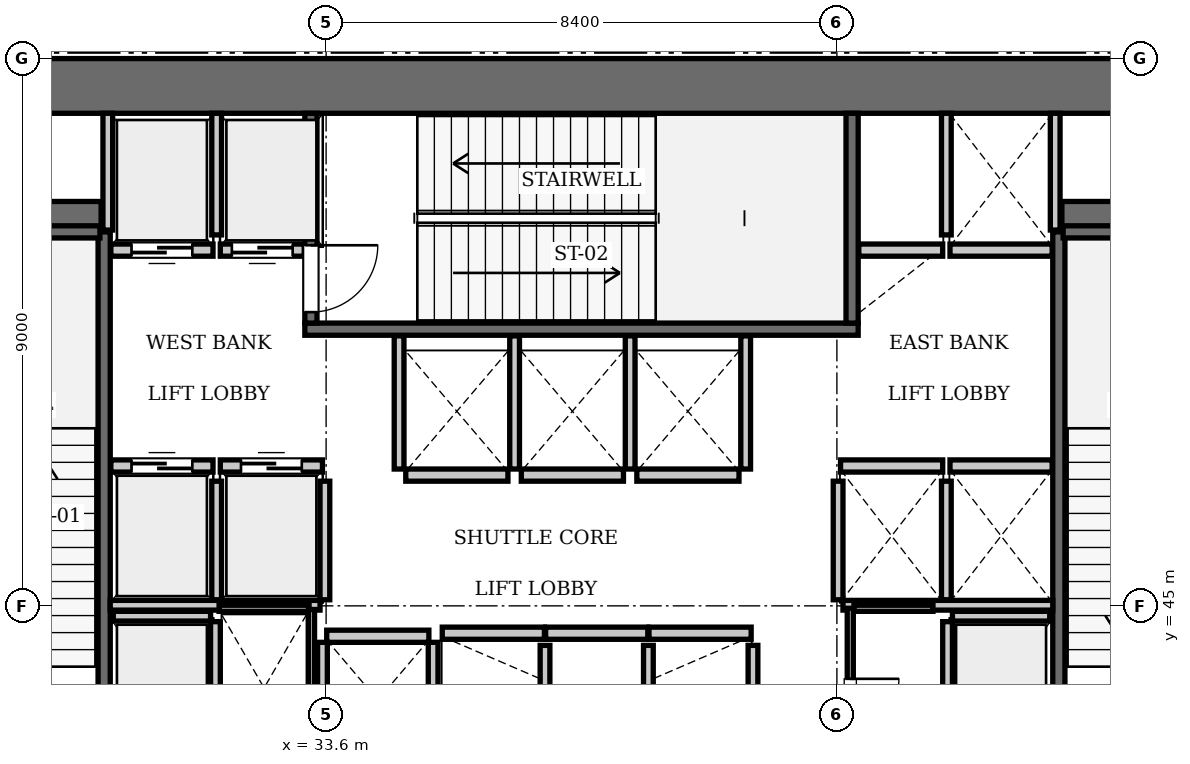
"""IFC4 building model, lengths in metres.
Left out: names, types, materials, properties, quantities, classifications, styles, units other than length and angle.
Written with IfcOpenShell. Run it as: python <this file> out.ifc"""

import sys

from ifc_helpers import new_model, si_unit, direction, frame, frame_2d, origin, place, context, subcontext, project, spatial, rectangle, extrude, element, fill, save


model = new_model("IFC4")
c1 = context("Model", 3, precision=1e-05, world=origin(), true_north=direction((0.0, 1.0)))
c2 = subcontext(c1, "Body", "Model", "MODEL_VIEW")
j1 = project(units=[si_unit("LENGTHUNIT", "METRE"), si_unit("PLANEANGLEUNIT", "RADIAN")], contexts=[c1])
p1 = place(None, origin())
s1 = spatial("IfcSite", under=j1, at=p1, CompositionType="ELEMENT")
p2 = place(p1, origin())
s2 = spatial("IfcBuilding", under=s1, at=p2, CompositionType="ELEMENT")
p3 = place(p2, frame((0.0, 0.0, 5.6)))
s3 = spatial("IfcBuildingStorey", under=s2, at=p3, CompositionType="ELEMENT", Elevation=5.6)
p4 = place(p3, frame((25.2, 53.55, 0.0), z_axis=(0.0, 0.0, 1.0), x_axis=(1.0, 0.0, 0.0)))
e1 = element("IfcWall", 1, at=p4, inside=s3, PredefinedType="SHEAR", context=c2, shape_type="SweptSolid", body=[
    extrude(rectangle(XDim=25.2, YDim=0.9, at=frame_2d((12.6, 0.0))), origin(), (0.0, 0.0, 1.0), 5.25),
])
p5 = place(p3, frame((26.1, 51.4, 0.0), z_axis=(0.0, 0.0, 1.0), x_axis=(1.0, 0.0, 0.0)))
e2 = element("IfcWall", 2, at=p5, inside=s3, PredefinedType="SHEAR", context=c2, shape_type="SweptSolid", body=[
    extrude(rectangle(XDim=3.8, YDim=0.5, at=frame_2d((1.9, 0.0))), origin(), (0.0, 0.0, 1.0), 5.25),
])
p6 = place(p3, frame((45.7, 51.4, 0.0), z_axis=(0.0, 0.0, 1.0), x_axis=(1.0, 0.0, 0.0)))
e3 = element("IfcWall", 3, at=p6, inside=s3, PredefinedType="SHEAR", context=c2, shape_type="SweptSolid", body=[
    extrude(rectangle(XDim=3.8, YDim=0.5, at=frame_2d((1.9, 0.0))), origin(), (0.0, 0.0, 1.0), 5.25),
])
p7 = place(p3, frame((29.95, 42.3, 0.0), z_axis=(0.0, 0.0, 1.0), x_axis=(0.0, 1.0, 0.0)))
e4 = element("IfcWall", 4, at=p7, inside=s3, PredefinedType="SOLIDWALL", context=c2, shape_type="SweptSolid", body=[
    extrude(rectangle(XDim=8.85, YDim=0.2, at=frame_2d((4.425, 0.0))), origin(), (0.0, 0.0, 1.0), 4.97),
])
p8 = place(p3, frame((26.38, 51.15, 0.0), z_axis=(0.0, 0.0, 1.0), x_axis=(1.0, 0.0, 0.0)))
e5 = element("IfcWall", 5, at=p8, inside=s3, PredefinedType="SOLIDWALL", context=c2, shape_type="SweptSolid", body=[
    extrude(rectangle(XDim=3.5, YDim=0.2, at=frame_2d((1.75, 0.0))), origin(), (0.0, 0.0, 1.0), 4.97),
])
p9 = place(p3, frame((33.25, 49.55, 0.0), z_axis=(0.0, 0.0, 1.0), x_axis=(1.0, 0.0, 0.0)))
e6 = element("IfcWall", 6, at=p9, inside=s3, PredefinedType="SOLIDWALL", context=c2, shape_type="SweptSolid", body=[
    extrude(rectangle(XDim=9.1, YDim=0.2, at=frame_2d((4.55, 0.0))), origin(), (0.0, 0.0, 1.0), 4.97),
])
p10 = place(p3, frame((42.25, 49.65, 0.0), z_axis=(0.0, 0.0, 1.0), x_axis=(0.0, 1.0, 0.0)))
e7 = element("IfcWall", 7, at=p10, inside=s3, PredefinedType="SOLIDWALL", context=c2, shape_type="SweptSolid", body=[
    extrude(rectangle(XDim=3.45, YDim=0.2, at=frame_2d((1.725, 0.0))), origin(), (0.0, 0.0, 1.0), 4.97),
])
p11 = place(p3, frame((33.35, 49.65, 0.0), z_axis=(0.0, 0.0, 1.0), x_axis=(0.0, 1.0, 0.0)))
e8 = element("IfcWall", 8, at=p11, inside=s3, PredefinedType="SOLIDWALL", context=c2, shape_type="SweptSolid", body=[
    extrude(rectangle(XDim=3.45, YDim=0.2, at=frame_2d((1.725, 0.0))), origin(), (0.0, 0.0, 1.0), 4.97),
])
p12 = place(p11, frame((0.18, 0.0, 0.0)))
e9 = element("IfcOpeningElement", 9, at=p12, cuts=e8, PredefinedType="OPENING", context=c2, shape_type="SweptSolid", body=[
    extrude(rectangle(XDim=1.1, YDim=2.15, at=frame_2d((0.55, 1.075))), frame((0.0, 0.11, 0.0), z_axis=(0.0, -1.0, 0.0), x_axis=(1.0, 0.0, 0.0)), (0.0, 0.0, 1.0), 0.22),
])
p13 = place(p3, frame((45.65, 42.3, 0.0), z_axis=(0.0, 0.0, 1.0), x_axis=(0.0, 1.0, 0.0)))
e10 = element("IfcWall", 10, at=p13, inside=s3, PredefinedType="SOLIDWALL", context=c2, shape_type="SweptSolid", body=[
    extrude(rectangle(XDim=8.85, YDim=0.2, at=frame_2d((4.425, 0.0))), origin(), (0.0, 0.0, 1.0), 4.97),
])
p14 = place(p3, frame((45.72, 51.15, 0.0), z_axis=(0.0, 0.0, 1.0), x_axis=(1.0, 0.0, 0.0)))
e11 = element("IfcWall", 11, at=p14, inside=s3, PredefinedType="SOLIDWALL", context=c2, shape_type="SweptSolid", body=[
    extrude(rectangle(XDim=3.5, YDim=0.2, at=frame_2d((1.75, 0.0))), origin(), (0.0, 0.0, 1.0), 4.97),
])
p15 = place(p3, frame((30.06, 47.3, 0.0), z_axis=(0.0, 0.0, 1.0), x_axis=(1.0, 0.0, 0.0)))
e12 = element("IfcWall", 12, at=p15, inside=s3, PredefinedType="SOLIDWALL", context=c2, shape_type="SweptSolid", body=[
    extrude(rectangle(XDim=1.68, YDim=0.2, at=frame_2d((0.84, 0.0))), origin(), (0.0, 0.0, 1.0), 4.97),
])
p16 = place(p15, frame((0.34, 0.0, 0.0)))
e13 = element("IfcOpeningElement", 13, at=p16, cuts=e12, PredefinedType="OPENING", context=c2, shape_type="SweptSolid", body=[
    extrude(rectangle(XDim=1.0, YDim=2.15, at=frame_2d((0.5, 1.075))), frame((0.0, 0.11, 0.0), z_axis=(0.0, -1.0, 0.0), x_axis=(1.0, 0.0, 0.0)), (0.0, 0.0, 1.0), 0.22),
])
p17 = place(p3, frame((31.86, 47.3, 0.0), z_axis=(0.0, 0.0, 1.0), x_axis=(1.0, 0.0, 0.0)))
e14 = element("IfcWall", 14, at=p17, inside=s3, PredefinedType="SOLIDWALL", context=c2, shape_type="SweptSolid", body=[
    extrude(rectangle(XDim=1.68, YDim=0.2, at=frame_2d((0.84, 0.0))), origin(), (0.0, 0.0, 1.0), 4.97),
])
p18 = place(p17, frame((0.34, 0.0, 0.0)))
e15 = element("IfcOpeningElement", 15, at=p18, cuts=e14, PredefinedType="OPENING", context=c2, shape_type="SweptSolid", body=[
    extrude(rectangle(XDim=1.0, YDim=2.15, at=frame_2d((0.5, 1.075))), frame((0.0, 0.11, 0.0), z_axis=(0.0, -1.0, 0.0), x_axis=(1.0, 0.0, 0.0)), (0.0, 0.0, 1.0), 0.22),
])
p19 = place(p3, frame((30.06, 50.85, 0.0), z_axis=(0.0, 0.0, 1.0), x_axis=(1.0, 0.0, 0.0)))
e16 = element("IfcWall", 16, at=p19, inside=s3, PredefinedType="SOLIDWALL", context=c2, shape_type="SweptSolid", body=[
    extrude(rectangle(XDim=1.68, YDim=0.2, at=frame_2d((0.84, 0.0))), origin(), (0.0, 0.0, 1.0), 4.97),
])
p20 = place(p19, frame((0.34, 0.0, 0.0)))
e17 = element("IfcOpeningElement", 17, at=p20, cuts=e16, PredefinedType="OPENING", context=c2, shape_type="SweptSolid", body=[
    extrude(rectangle(XDim=1.0, YDim=2.15, at=frame_2d((0.5, 1.075))), frame((0.0, 0.11, 0.0), z_axis=(0.0, -1.0, 0.0), x_axis=(1.0, 0.0, 0.0)), (0.0, 0.0, 1.0), 0.22),
])
p21 = place(p3, frame((31.86, 50.85, 0.0), z_axis=(0.0, 0.0, 1.0), x_axis=(1.0, 0.0, 0.0)))
e18 = element("IfcWall", 18, at=p21, inside=s3, PredefinedType="SOLIDWALL", context=c2, shape_type="SweptSolid", body=[
    extrude(rectangle(XDim=1.38, YDim=0.2, at=frame_2d((0.69, 0.0))), origin(), (0.0, 0.0, 1.0), 4.97),
])
p22 = place(p21, frame((0.19, 0.0, 0.0)))
e19 = element("IfcOpeningElement", 19, at=p22, cuts=e18, PredefinedType="OPENING", context=c2, shape_type="SweptSolid", body=[
    extrude(rectangle(XDim=1.0, YDim=2.15, at=frame_2d((0.5, 1.075))), frame((0.0, 0.11, 0.0), z_axis=(0.0, -1.0, 0.0), x_axis=(1.0, 0.0, 0.0)), (0.0, 0.0, 1.0), 0.22),
])
for number, where, z_axis, x_axis in (
    (20, (42.06, 47.3, 0.0), (0.0, 0.0, 1.0), (1.0, 0.0, 0.0)),
    (21, (43.86, 47.3, 0.0), (0.0, 0.0, 1.0), (1.0, 0.0, 0.0)),
):
    element("IfcWall", number, at=place(p3, frame(where, z_axis=z_axis, x_axis=x_axis)), inside=s3, PredefinedType="SOLIDWALL", context=c2, shape_type="SweptSolid", body=[
        extrude(rectangle(XDim=1.68, YDim=0.2, at=frame_2d((0.84, 0.0))), origin(), (0.0, 0.0, 1.0), 4.97),
    ])
p23 = place(p3, frame((42.36, 50.85, 0.0), z_axis=(0.0, 0.0, 1.0), x_axis=(1.0, 0.0, 0.0)))
e22 = element("IfcWall", 22, at=p23, inside=s3, PredefinedType="SOLIDWALL", context=c2, shape_type="SweptSolid", body=[
    extrude(rectangle(XDim=1.38, YDim=0.2, at=frame_2d((0.69, 0.0))), origin(), (0.0, 0.0, 1.0), 4.97),
])
for number, where, z_axis, x_axis in (
    (23, (43.86, 50.85, 0.0), (0.0, 0.0, 1.0), (1.0, 0.0, 0.0)),
    (24, (35.51, 44.55, 0.0), (0.0, 0.0, 1.0), (1.0, 0.0, 0.0)),
    (25, (37.21, 44.55, 0.0), (0.0, 0.0, 1.0), (1.0, 0.0, 0.0)),
):
    element("IfcWall", number, at=place(p3, frame(where, z_axis=z_axis, x_axis=x_axis)), inside=s3, PredefinedType="SOLIDWALL", context=c2, shape_type="SweptSolid", body=[
        extrude(rectangle(XDim=1.68, YDim=0.2, at=frame_2d((0.84, 0.0))), origin(), (0.0, 0.0, 1.0), 4.97),
    ])
for number, where, z_axis, x_axis in (
    (26, (38.91, 44.55, 0.0), (0.0, 0.0, 1.0), (1.0, 0.0, 0.0)),
    (27, (34.91, 47.15, 0.0), (0.0, 0.0, 1.0), (1.0, 0.0, 0.0)),
):
    element("IfcWall", number, at=place(p3, frame(where, z_axis=z_axis, x_axis=x_axis)), inside=s3, PredefinedType="SOLIDWALL", context=c2, shape_type="SweptSolid", body=[
        extrude(rectangle(XDim=1.68, YDim=0.2, at=frame_2d((0.84, 0.0))), origin(), (0.0, 0.0, 1.0), 4.97),
    ])
for number, where, z_axis, x_axis in (
    (28, (36.81, 47.15, 0.0), (0.0, 0.0, 1.0), (1.0, 0.0, 0.0)),
    (29, (38.71, 47.15, 0.0), (0.0, 0.0, 1.0), (1.0, 0.0, 0.0)),
    (30, (33.61, 44.5, 0.0), (0.0, 0.0, 1.0), (1.0, 0.0, 0.0)),
):
    element("IfcWall", number, at=place(p3, frame(where, z_axis=z_axis, x_axis=x_axis)), inside=s3, PredefinedType="SOLIDWALL", context=c2, shape_type="SweptSolid", body=[
        extrude(rectangle(XDim=1.68, YDim=0.2, at=frame_2d((0.84, 0.0))), origin(), (0.0, 0.0, 1.0), 4.97),
    ])
p24 = place(p3, frame((30.1, 44.83, 0.0), z_axis=(0.0, 0.0, 1.0), x_axis=(1.0, 0.0, 0.0)))
e31 = element("IfcWall", 31, at=p24, inside=s3, PredefinedType="SOLIDWALL", context=c2, shape_type="SweptSolid", body=[
    extrude(rectangle(XDim=1.6, YDim=0.16, at=frame_2d((0.8, 0.0))), origin(), (0.0, 0.0, 1.0), 4.97),
])
p25 = place(p3, frame((31.78, 42.3, 0.0), z_axis=(0.0, 0.0, 1.0), x_axis=(0.0, 1.0, 0.0)))
e32 = element("IfcWall", 32, at=p25, inside=s3, PredefinedType="SOLIDWALL", context=c2, shape_type="SweptSolid", body=[
    extrude(rectangle(XDim=2.44, YDim=0.16, at=frame_2d((1.22, 0.0))), origin(), (0.0, 0.0, 1.0), 4.97),
])
p26 = place(p3, frame((43.9, 44.83, 0.0), z_axis=(0.0, 0.0, 1.0), x_axis=(1.0, 0.0, 0.0)))
e33 = element("IfcWall", 33, at=p26, inside=s3, PredefinedType="SOLIDWALL", context=c2, shape_type="SweptSolid", body=[
    extrude(rectangle(XDim=1.6, YDim=0.16, at=frame_2d((0.8, 0.0))), origin(), (0.0, 0.0, 1.0), 4.97),
])
p27 = place(p3, frame((43.82, 42.3, 0.0), z_axis=(0.0, 0.0, 1.0), x_axis=(0.0, 1.0, 0.0)))
e34 = element("IfcWall", 34, at=p27, inside=s3, PredefinedType="SOLIDWALL", context=c2, shape_type="SweptSolid", body=[
    extrude(rectangle(XDim=2.44, YDim=0.16, at=frame_2d((1.22, 0.0))), origin(), (0.0, 0.0, 1.0), 4.97),
])
for number, where, z_axis, x_axis in (
    (35, (31.8, 45.1, 0.0), (0.0, 0.0, 1.0), (0.0, 1.0, 0.0)),
    (36, (33.58, 45.1, 0.0), (0.0, 0.0, 1.0), (0.0, 1.0, 0.0)),
):
    element("IfcWall", number, at=place(p3, frame(where, z_axis=z_axis, x_axis=x_axis)), inside=s3, PredefinedType="SOLIDWALL", context=c2, shape_type="SweptSolid", body=[
        extrude(rectangle(XDim=1.95, YDim=0.16, at=frame_2d((0.975, 0.0))), origin(), (0.0, 0.0, 1.0), 4.97),
    ])
p28 = place(p3, frame((30.05, 45.01, 0.0), z_axis=(0.0, 0.0, 1.0), x_axis=(1.0, 0.0, 0.0)))
e37 = element("IfcWall", 37, at=p28, inside=s3, PredefinedType="SOLIDWALL", context=c2, shape_type="SweptSolid", body=[
    extrude(rectangle(XDim=3.45, YDim=0.16, at=frame_2d((1.725, 0.0))), origin(), (0.0, 0.0, 1.0), 4.97),
])
p29 = place(p3, frame((30.01, 51.18, 0.0), z_axis=(0.0, 0.0, 1.0), x_axis=(0.0, 1.0, 0.0)))
e38 = element("IfcWall", 38, at=p29, inside=s3, PredefinedType="SOLIDWALL", context=c2, shape_type="SweptSolid", body=[
    extrude(rectangle(XDim=1.92, YDim=0.16, at=frame_2d((0.96, 0.0))), origin(), (0.0, 0.0, 1.0), 4.97),
])
p30 = place(p3, frame((31.8, 51.1, 0.0), z_axis=(0.0, 0.0, 1.0), x_axis=(0.0, 1.0, 0.0)))
e39 = element("IfcWall", 39, at=p30, inside=s3, PredefinedType="SOLIDWALL", context=c2, shape_type="SweptSolid", body=[
    extrude(rectangle(XDim=2.0, YDim=0.16, at=frame_2d((1.0, 0.0))), origin(), (0.0, 0.0, 1.0), 4.97),
])
for number, where, z_axis, x_axis in (
    (40, (42.02, 45.1, 0.0), (0.0, 0.0, 1.0), (0.0, 1.0, 0.0)),
    (41, (43.8, 45.1, 0.0), (0.0, 0.0, 1.0), (0.0, 1.0, 0.0)),
):
    element("IfcWall", number, at=place(p3, frame(where, z_axis=z_axis, x_axis=x_axis)), inside=s3, PredefinedType="SOLIDWALL", context=c2, shape_type="SweptSolid", body=[
        extrude(rectangle(XDim=1.95, YDim=0.16, at=frame_2d((0.975, 0.0))), origin(), (0.0, 0.0, 1.0), 4.97),
    ])
p31 = place(p3, frame((42.1, 45.01, 0.0), z_axis=(0.0, 0.0, 1.0), x_axis=(1.0, 0.0, 0.0)))
e42 = element("IfcWall", 42, at=p31, inside=s3, PredefinedType="SOLIDWALL", context=c2, shape_type="SweptSolid", body=[
    extrude(rectangle(XDim=3.45, YDim=0.16, at=frame_2d((1.725, 0.0))), origin(), (0.0, 0.0, 1.0), 4.97),
])
p32 = place(p3, frame((45.59, 51.18, 0.0), z_axis=(0.0, 0.0, 1.0), x_axis=(0.0, 1.0, 0.0)))
e43 = element("IfcWall", 43, at=p32, inside=s3, PredefinedType="SOLIDWALL", context=c2, shape_type="SweptSolid", body=[
    extrude(rectangle(XDim=1.92, YDim=0.16, at=frame_2d((0.96, 0.0))), origin(), (0.0, 0.0, 1.0), 4.97),
])
p33 = place(p3, frame((43.8, 51.1, 0.0), z_axis=(0.0, 0.0, 1.0), x_axis=(0.0, 1.0, 0.0)))
e44 = element("IfcWall", 44, at=p33, inside=s3, PredefinedType="SOLIDWALL", context=c2, shape_type="SweptSolid", body=[
    extrude(rectangle(XDim=2.0, YDim=0.16, at=frame_2d((1.0, 0.0))), origin(), (0.0, 0.0, 1.0), 4.97),
])
for number, where, z_axis, x_axis in (
    (45, (37.2, 42.3, 0.0), (0.0, 0.0, 1.0), (0.0, 1.0, 0.0)),
    (46, (38.9, 42.3, 0.0), (0.0, 0.0, 1.0), (0.0, 1.0, 0.0)),
    (47, (40.62, 42.3, 0.0), (0.0, 0.0, 1.0), (0.0, 1.0, 0.0)),
):
    element("IfcWall", number, at=place(p3, frame(where, z_axis=z_axis, x_axis=x_axis)), inside=s3, PredefinedType="SOLIDWALL", context=c2, shape_type="SweptSolid", body=[
        extrude(rectangle(XDim=2.05, YDim=0.16, at=frame_2d((1.025, 0.0))), origin(), (0.0, 0.0, 1.0), 4.97),
    ])
for number, where, z_axis, x_axis in (
    (48, (34.8, 47.25, 0.0), (0.0, 0.0, 1.0), (0.0, 1.0, 0.0)),
    (49, (36.7, 47.25, 0.0), (0.0, 0.0, 1.0), (0.0, 1.0, 0.0)),
    (50, (38.6, 47.25, 0.0), (0.0, 0.0, 1.0), (0.0, 1.0, 0.0)),
    (51, (40.5, 47.25, 0.0), (0.0, 0.0, 1.0), (0.0, 1.0, 0.0)),
):
    element("IfcWall", number, at=place(p3, frame(where, z_axis=z_axis, x_axis=x_axis)), inside=s3, PredefinedType="SOLIDWALL", context=c2, shape_type="SweptSolid", body=[
        extrude(rectangle(XDim=2.19, YDim=0.16, at=frame_2d((1.095, 0.0))), origin(), (0.0, 0.0, 1.0), 4.97),
    ])
for number, where, z_axis, x_axis in (
    (52, (33.54, 42.3, 0.0), (0.0, 0.0, 1.0), (0.0, 1.0, 0.0)),
    (53, (35.36, 42.3, 0.0), (0.0, 0.0, 1.0), (0.0, 1.0, 0.0)),
):
    element("IfcWall", number, at=place(p3, frame(where, z_axis=z_axis, x_axis=x_axis)), inside=s3, PredefinedType="SOLIDWALL", context=c2, shape_type="SweptSolid", body=[
        extrude(rectangle(XDim=2.1, YDim=0.16, at=frame_2d((1.05, 0.0))), origin(), (0.0, 0.0, 1.0), 4.97),
    ])
p34 = place(p3, frame((31.84, 44.96, 0.0), z_axis=(0.0, 0.0, 1.0), x_axis=(1.0, 0.0, 0.0)))
e54 = element("IfcWall", 54, at=p34, inside=s3, PredefinedType="PARTITIONING", context=c2, shape_type="SweptSolid", body=[
    extrude(rectangle(XDim=1.48, YDim=0.1, at=frame_2d((0.74, 0.0))), origin(), (0.0, 0.0, 1.0), 4.97),
])
p35 = place(p3, frame((33.36, 42.36, 0.0), z_axis=(0.0, 0.0, 1.0), x_axis=(0.0, 1.0, 0.0)))
e55 = element("IfcWall", 55, at=p35, inside=s3, PredefinedType="PARTITIONING", context=c2, shape_type="SweptSolid", body=[
    extrude(rectangle(XDim=2.58, YDim=0.1, at=frame_2d((1.29, 0.0))), origin(), (0.0, 0.0, 1.0), 4.97),
])
p36 = place(p3, frame((42.22, 42.35, 0.0), z_axis=(0.0, 0.0, 1.0), x_axis=(0.0, 1.0, 0.0)))
e56 = element("IfcWall", 56, at=p36, inside=s3, PredefinedType="PARTITIONING", context=c2, shape_type="SweptSolid", body=[
    extrude(rectangle(XDim=2.61, YDim=0.1, at=frame_2d((1.305, 0.0))), origin(), (0.0, 0.0, 1.0), 4.97),
])
p37 = place(p36, frame((0.65, 0.0, 0.0)))
e57 = element("IfcOpeningElement", 57, at=p37, cuts=e56, PredefinedType="OPENING", context=c2, shape_type="SweptSolid", body=[
    extrude(rectangle(XDim=0.8, YDim=2.05, at=frame_2d((0.4, 1.025))), frame((0.0, 0.06, 0.0), z_axis=(0.0, -1.0, 0.0), x_axis=(1.0, 0.0, 0.0)), (0.0, 0.0, 1.0), 0.12),
])
p38 = place(p3, frame((42.28, 44.96, 0.0), z_axis=(0.0, 0.0, 1.0), x_axis=(1.0, 0.0, 0.0)))
e58 = element("IfcWall", 58, at=p38, inside=s3, PredefinedType="PARTITIONING", context=c2, shape_type="SweptSolid", body=[
    extrude(rectangle(XDim=1.3, YDim=0.1, at=frame_2d((0.65, 0.0))), origin(), (0.0, 0.0, 1.0), 4.97),
])
p39 = place(p12, frame((1.1, 0.0, 0.0), z_axis=(0.0, 0.0, 1.0), x_axis=(-1.0, 0.0, 0.0)))
e59 = element("IfcDoor", 59, at=p39, inside=s3, OperationType="SINGLE_SWING_LEFT", PredefinedType="DOOR", context=c2, shape_type="SweptSolid", body=[
    extrude(rectangle(XDim=1.1, YDim=2.15, at=frame_2d((0.55, 1.075))), frame((0.0, 0.025, 0.0), z_axis=(0.0, -1.0, 0.0), x_axis=(1.0, 0.0, 0.0)), (0.0, 0.0, 1.0), 0.05),
])
fill(e9, e59)
p40 = place(p16, origin())
e60 = element("IfcDoor", 60, at=p40, inside=s3, OperationType="SLIDING_TO_LEFT", PredefinedType="DOOR", context=c2, shape_type="SweptSolid", body=[
    extrude(rectangle(XDim=1.0, YDim=2.15, at=frame_2d((0.5, 1.075))), frame((0.0, 0.025, 0.0), z_axis=(0.0, -1.0, 0.0), x_axis=(1.0, 0.0, 0.0)), (0.0, 0.0, 1.0), 0.05),
])
fill(e13, e60)
p41 = place(p18, origin())
e61 = element("IfcDoor", 61, at=p41, inside=s3, OperationType="SLIDING_TO_LEFT", PredefinedType="DOOR", context=c2, shape_type="SweptSolid", body=[
    extrude(rectangle(XDim=1.0, YDim=2.15, at=frame_2d((0.5, 1.075))), frame((0.0, 0.025, 0.0), z_axis=(0.0, -1.0, 0.0), x_axis=(1.0, 0.0, 0.0)), (0.0, 0.0, 1.0), 0.05),
])
fill(e15, e61)
p42 = place(p20, frame((1.0, 0.0, 0.0), z_axis=(0.0, 0.0, 1.0), x_axis=(-1.0, 0.0, 0.0)))
e62 = element("IfcDoor", 62, at=p42, inside=s3, OperationType="SLIDING_TO_LEFT", PredefinedType="DOOR", context=c2, shape_type="SweptSolid", body=[
    extrude(rectangle(XDim=1.0, YDim=2.15, at=frame_2d((0.5, 1.075))), frame((0.0, 0.025, 0.0), z_axis=(0.0, -1.0, 0.0), x_axis=(1.0, 0.0, 0.0)), (0.0, 0.0, 1.0), 0.05),
])
fill(e17, e62)
p43 = place(p22, frame((1.0, 0.0, 0.0), z_axis=(0.0, 0.0, 1.0), x_axis=(-1.0, 0.0, 0.0)))
e63 = element("IfcDoor", 63, at=p43, inside=s3, OperationType="SLIDING_TO_LEFT", PredefinedType="DOOR", context=c2, shape_type="SweptSolid", body=[
    extrude(rectangle(XDim=1.0, YDim=2.15, at=frame_2d((0.5, 1.075))), frame((0.0, 0.025, 0.0), z_axis=(0.0, -1.0, 0.0), x_axis=(1.0, 0.0, 0.0)), (0.0, 0.0, 1.0), 0.05),
])
fill(e19, e63)
p44 = place(p37, frame((0.8, 0.0, 0.0), z_axis=(0.0, 0.0, 1.0), x_axis=(-1.0, 0.0, 0.0)))
e64 = element("IfcDoor", 64, at=p44, inside=s3, OperationType="SINGLE_SWING_LEFT", PredefinedType="DOOR", context=c2, shape_type="SweptSolid", body=[
    extrude(rectangle(XDim=0.8, YDim=2.05, at=frame_2d((0.4, 1.025))), frame((0.0, 0.025, 0.0), z_axis=(0.0, -1.0, 0.0), x_axis=(1.0, 0.0, 0.0)), (0.0, 0.0, 1.0), 0.05),
])
fill(e57, e64)
save(model, sys.argv[1])
